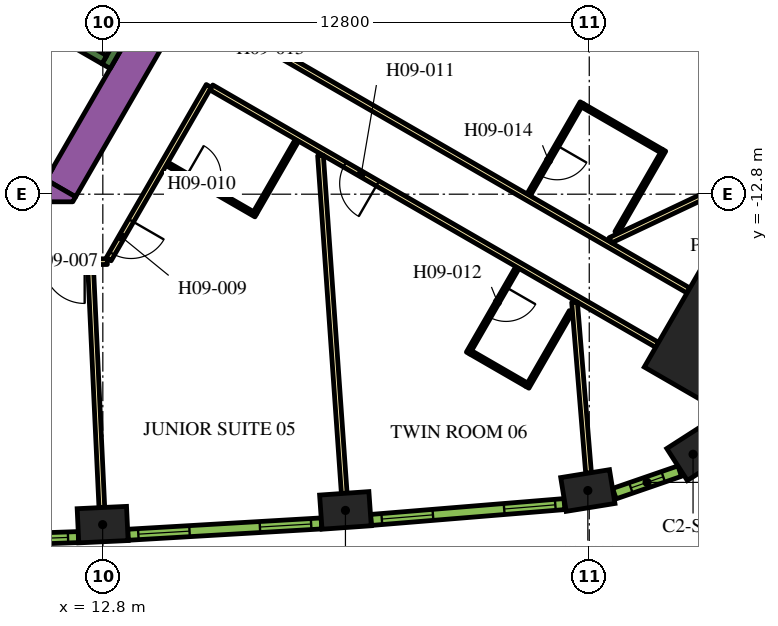
"""IFC4 building model, lengths in metres.
Left out: names, types, materials, properties, quantities, classifications, styles, units other than length and angle.
Written with IfcOpenShell. Run it as: python <this file> out.ifc"""

import sys

from ifc_helpers import new_model, si_unit, direction, frame, frame_2d, origin, origin_2d, place, context, subcontext, project, spatial, polyline, rectangle, outline, extrude, element, fill, save


model = new_model("IFC4")
c1 = context("Model", 3, precision=1e-05, world=origin(), true_north=direction((0.0, 1.0)))
c2 = subcontext(c1, "Body", "Model", "MODEL_VIEW")
j1 = project(units=[si_unit("LENGTHUNIT", "METRE"), si_unit("PLANEANGLEUNIT", "RADIAN")], contexts=[c1])
p1 = place(None, origin())
s1 = spatial("IfcSite", under=j1, at=p1, CompositionType="ELEMENT")
p2 = place(p1, origin())
s2 = spatial("IfcBuilding", under=s1, at=p2, CompositionType="ELEMENT")
p3 = place(p2, frame((0.0, 0.0, 126.6)))
s3 = spatial("IfcBuildingStorey", under=s2, at=p3, CompositionType="ELEMENT", Elevation=126.6)
p4 = place(p3, frame((29.097, -16.799, 0.0), z_axis=(0.0, 0.0, 1.0), x_axis=(0.866025403784, -0.5, 0.0)))
e1 = element("IfcColumn", 1, at=p4, inside=s3, PredefinedType="COLUMN", context=c2, shape_type="SweptSolid", body=[
    extrude(rectangle(XDim=3.0, YDim=3.0, at=origin_2d()), origin(), (0.0, 0.0, 1.0), 3.9),
])
for number, where, z_axis, x_axis in (
    (2, (12.795, -21.494, 0.0), (0.0, 0.0, 1.0), (0.999, 0.047, 0.0)),
    (3, (19.184, -21.12, 0.0), (0.0, 0.0, 1.0), (0.998, 0.07, 0.0)),
    (4, (25.563, -20.597, 0.0), (0.0, 0.0, 1.0), (0.987, 0.159, 0.0)),
):
    element("IfcColumn", number, at=place(p3, frame(where, z_axis=z_axis, x_axis=x_axis)), inside=s3, PredefinedType="COLUMN", context=c2, shape_type="SweptSolid", body=[
        extrude(rectangle(XDim=1.3, YDim=0.9, at=origin_2d()), origin(), (0.0, 0.0, 1.0), 3.9),
    ])
p5 = place(p3, frame((28.331, -19.643, 0.0), z_axis=(0.0, 0.0, 1.0), x_axis=(0.841700252504, 0.53994507585, 0.0)))
e5 = element("IfcColumn", 5, at=p5, inside=s3, PredefinedType="COLUMN", context=c2, shape_type="SweptSolid", body=[
    extrude(rectangle(XDim=1.0, YDim=1.0, at=origin_2d()), origin(), (0.0, 0.0, 1.0), 3.9),
])
p6 = place(p3, frame((11.695, -12.644, 0.0), z_axis=(0.0, 0.0, 1.0), x_axis=(0.500010229568, 0.86601949766, 0.0)))
e6 = element("IfcWall", 6, at=p6, inside=s3, PredefinedType="SOLIDWALL", context=c2, shape_type="SweptSolid", body=[
    extrude(rectangle(XDim=9.326, YDim=0.9, at=frame_2d((4.663, 0.0))), origin(), (0.0, 0.0, 1.0), 3.9),
])
p7 = place(p3, origin())
e7 = element("IfcWall", 7, at=p7, inside=s3, PredefinedType="SOLIDWALL", context=c2, shape_type="SweptSolid", body=[
    extrude(outline(polyline([(12.009, -13.0), (11.312, -13.0), (11.312, -12.425), (12.083, -12.871), (12.009, -13.0)])), origin(), (0.0, 0.0, 1.0), 3.9),
])
e8 = element("IfcWall", 8, at=p7, inside=s3, PredefinedType="SOLIDWALL", context=c2, shape_type="SweptSolid", body=[
    extrude(outline(polyline([(11.489, -12.1), (11.312, -12.407), (11.312, -12.1), (11.489, -12.1)])), origin(), (0.0, 0.0, 1.0), 3.9),
])
p8 = place(p3, frame((12.885, -9.431, 0.0), z_axis=(0.0, 0.0, 1.0), x_axis=(0.500020560727, 0.866013532718, 0.0)))
e9 = element("IfcWall", 9, at=p8, inside=s3, PredefinedType="SOLIDWALL", context=c2, shape_type="SweptSolid", body=[
    extrude(rectangle(XDim=3.45, YDim=0.25, at=frame_2d((1.725, 0.0))), origin(), (0.0, 0.0, 1.0), 3.9),
])
p9 = place(p3, frame((12.84, -9.261, 0.0), z_axis=(0.0, 0.0, 1.0), x_axis=(-0.866013990052, 0.500019768644, 0.0)))
e10 = element("IfcWall", 10, at=p9, inside=s3, PredefinedType="SOLIDWALL", context=c2, shape_type="SweptSolid", body=[
    extrude(rectangle(XDim=6.8, YDim=0.25, at=frame_2d((3.4, 0.0))), origin(), (0.0, 0.0, 1.0), 3.9),
])
p10 = place(p3, frame((16.412, -8.523, 0.0), z_axis=(0.0, 0.0, 1.0), x_axis=(0.866025629663, -0.499999608766, 0.0)))
e11 = element("IfcWall", 11, at=p10, inside=s3, PredefinedType="PARTITIONING", context=c2, shape_type="SweptSolid", body=[
    extrude(rectangle(XDim=13.624, YDim=0.15, at=frame_2d((6.812, 0.0))), origin(), (0.0, 0.0, 1.0), 2.75),
])
p11 = place(p10, frame((0.426, 0.0, 0.0)))
e12 = element("IfcOpeningElement", 12, at=p11, cuts=e11, PredefinedType="OPENING", context=c2, shape_type="SweptSolid", body=[
    extrude(rectangle(XDim=1.0, YDim=2.1, at=frame_2d((0.5, 1.05))), frame((0.0, 0.085, 0.0), z_axis=(0.0, -1.0, 0.0), x_axis=(1.0, 0.0, 0.0)), (0.0, 0.0, 1.0), 0.17),
])
p12 = place(p3, frame((12.918, -14.575, 0.0), z_axis=(0.0, 0.0, 1.0), x_axis=(-1.0, 0.0, 0.0)))
e13 = element("IfcWall", 13, at=p12, inside=s3, PredefinedType="PARTITIONING", context=c2, shape_type="SweptSolid", body=[
    extrude(rectangle(XDim=25.766, YDim=0.15, at=frame_2d((12.883, 0.0))), origin(), (0.0, 0.0, 1.0), 2.75),
])
p13 = place(p12, frame((16.189, 0.0, 0.0)))
e14 = element("IfcOpeningElement", 14, at=p13, cuts=e13, PredefinedType="OPENING", context=c2, shape_type="SweptSolid", body=[
    extrude(rectangle(XDim=1.0, YDim=2.1, at=frame_2d((0.5, 1.05))), frame((0.0, 0.085, 0.0), z_axis=(0.0, -1.0, 0.0), x_axis=(1.0, 0.0, 0.0)), (0.0, 0.0, 1.0), 0.17),
])
p14 = place(p12, frame((14.882, 0.0, 0.0)))
e15 = element("IfcOpeningElement", 15, at=p14, cuts=e13, PredefinedType="OPENING", context=c2, shape_type="SweptSolid", body=[
    extrude(rectangle(XDim=1.0, YDim=2.1, at=frame_2d((0.5, 1.05))), frame((0.0, 0.085, 0.0), z_axis=(0.0, -1.0, 0.0), x_axis=(1.0, 0.0, 0.0)), (0.0, 0.0, 1.0), 0.17),
])
p15 = place(p12, frame((0.596, 0.0, 0.0)))
e16 = element("IfcOpeningElement", 16, at=p15, cuts=e13, PredefinedType="OPENING", context=c2, shape_type="SweptSolid", body=[
    extrude(rectangle(XDim=1.1, YDim=2.1, at=frame_2d((0.55, 1.05))), frame((0.0, 0.085, 0.0), z_axis=(0.0, -1.0, 0.0), x_axis=(1.0, 0.0, 0.0)), (0.0, 0.0, 1.0), 0.17),
])
p16 = place(p3, frame((15.587, -9.952, 0.0), z_axis=(0.0, 0.0, 1.0), x_axis=(-0.500016618951, -0.866015808616, 0.0)))
e17 = element("IfcWall", 17, at=p16, inside=s3, PredefinedType="PARTITIONING", context=c2, shape_type="SweptSolid", body=[
    extrude(rectangle(XDim=5.268, YDim=0.15, at=frame_2d((2.634, 0.0))), origin(), (0.0, 0.0, 1.0), 2.75),
])
p17 = place(p16, frame((4.088, 0.0, 0.0)))
e18 = element("IfcOpeningElement", 18, at=p17, cuts=e17, PredefinedType="OPENING", context=c2, shape_type="SweptSolid", body=[
    extrude(rectangle(XDim=1.0, YDim=2.1, at=frame_2d((0.5, 1.05))), frame((0.0, 0.085, 0.0), z_axis=(0.0, -1.0, 0.0), x_axis=(1.0, 0.0, 0.0)), (0.0, 0.0, 1.0), 0.17),
])
p18 = place(p3, frame((27.386, -16.764, 0.0), z_axis=(0.0, 0.0, 1.0), x_axis=(-0.866022585856, 0.500004880763, 0.0)))
e19 = element("IfcWall", 19, at=p18, inside=s3, PredefinedType="PARTITIONING", context=c2, shape_type="SweptSolid", body=[
    extrude(rectangle(XDim=13.544, YDim=0.15, at=frame_2d((6.772, 0.0))), origin(), (0.0, 0.0, 1.0), 2.75),
])
p19 = place(p18, frame((8.491, 0.0, 0.0)))
e20 = element("IfcOpeningElement", 20, at=p19, cuts=e19, PredefinedType="OPENING", context=c2, shape_type="SweptSolid", body=[
    extrude(rectangle(XDim=1.0, YDim=2.1, at=frame_2d((0.5, 1.05))), frame((0.0, 0.085, 0.0), z_axis=(0.0, -1.0, 0.0), x_axis=(1.0, 0.0, 0.0)), (0.0, 0.0, 1.0), 0.17),
])
p20 = place(p3, frame((12.774, -21.045, 0.0), z_axis=(0.0, 0.0, 1.0), x_axis=(-0.046750341626, 0.998906605023, 0.0)))
e21 = element("IfcWall", 21, at=p20, inside=s3, PredefinedType="PARTITIONING", context=c2, shape_type="SweptSolid", body=[
    extrude(rectangle(XDim=6.392, YDim=0.15, at=frame_2d((3.196, 0.0))), origin(), (0.0, 0.0, 1.0), 2.75),
])
p21 = place(p3, frame((19.153, -20.671, 0.0), z_axis=(0.0, 0.0, 1.0), x_axis=(-0.070070736723, 0.997542025107, 0.0)))
e22 = element("IfcWall", 22, at=p21, inside=s3, PredefinedType="PARTITIONING", context=c2, shape_type="SweptSolid", body=[
    extrude(rectangle(XDim=8.909, YDim=0.15, at=frame_2d((4.455, 0.0))), origin(), (0.0, 0.0, 1.0), 2.75),
])
p22 = place(p3, frame((25.582, -20.138, 0.0), z_axis=(0.0, 0.0, 1.0), x_axis=(-0.081746132986, 0.996653184283, 0.0)))
e23 = element("IfcWall", 23, at=p22, inside=s3, PredefinedType="PARTITIONING", context=c2, shape_type="SweptSolid", body=[
    extrude(rectangle(XDim=4.51, YDim=0.15, at=frame_2d((2.255, 0.0))), origin(), (0.0, 0.0, 1.0), 2.75),
])
p23 = place(p3, frame((30.231, -12.085, 0.0), z_axis=(0.0, 0.0, 1.0), x_axis=(-0.904001132572, -0.427530060122, 0.0)))
e24 = element("IfcWall", 24, at=p23, inside=s3, PredefinedType="PARTITIONING", context=c2, shape_type="SweptSolid", body=[
    extrude(rectangle(XDim=4.51, YDim=0.15, at=frame_2d((2.255, 0.0))), origin(), (0.0, 0.0, 1.0), 2.75),
])
p24 = place(p3, frame((14.49, -12.003, 0.0), z_axis=(0.0, 0.0, 1.0), x_axis=(0.866059108428, -0.4999416173, 0.0)))
e25 = element("IfcWall", 25, at=p24, inside=s3, PredefinedType="PARTITIONING", context=c2, shape_type="SweptSolid", body=[
    extrude(rectangle(XDim=2.7, YDim=0.1, at=frame_2d((1.35, 0.0))), origin(), (0.0, 0.0, 1.0), 2.75),
])
p25 = place(p24, frame((0.6, 0.0, 0.0)))
e26 = element("IfcOpeningElement", 26, at=p25, cuts=e25, PredefinedType="OPENING", context=c2, shape_type="SweptSolid", body=[
    extrude(rectangle(XDim=0.9, YDim=2.1, at=frame_2d((0.45, 1.05))), frame((0.0, 0.06, 0.0), z_axis=(0.0, -1.0, 0.0), x_axis=(1.0, 0.0, 0.0)), (0.0, 0.0, 1.0), 0.12),
])
p26 = place(p3, frame((16.81, -13.285, 0.0), z_axis=(0.0, 0.0, 1.0), x_axis=(0.499994660107, 0.866028486751, 0.0)))
e27 = element("IfcWall", 27, at=p26, inside=s3, PredefinedType="PARTITIONING", context=c2, shape_type="SweptSolid", body=[
    extrude(rectangle(XDim=2.2, YDim=0.1, at=frame_2d((1.1, 0.0))), origin(), (0.0, 0.0, 1.0), 2.75),
])
p27 = place(p3, frame((23.71, -14.728, 0.0), z_axis=(0.0, 0.0, 1.0), x_axis=(-0.500006934395, -0.866021400173, 0.0)))
e28 = element("IfcWall", 28, at=p27, inside=s3, PredefinedType="PARTITIONING", context=c2, shape_type="SweptSolid", body=[
    extrude(rectangle(XDim=2.6, YDim=0.1, at=frame_2d((1.3, 0.0))), origin(), (0.0, 0.0, 1.0), 2.75),
])
p28 = place(p27, frame((0.6, 0.0, 0.0)))
e29 = element("IfcOpeningElement", 29, at=p28, cuts=e28, PredefinedType="OPENING", context=c2, shape_type="SweptSolid", body=[
    extrude(rectangle(XDim=0.9, YDim=2.1, at=frame_2d((0.45, 1.05))), frame((0.0, 0.06, 0.0), z_axis=(0.0, -1.0, 0.0), x_axis=(1.0, 0.0, 0.0)), (0.0, 0.0, 1.0), 0.12),
])
p29 = place(p3, frame((22.479, -16.962, 0.0), z_axis=(0.0, 0.0, 1.0), x_axis=(0.86605165483, -0.499954529098, 0.0)))
e30 = element("IfcWall", 30, at=p29, inside=s3, PredefinedType="PARTITIONING", context=c2, shape_type="SweptSolid", body=[
    extrude(rectangle(XDim=1.7, YDim=0.1, at=frame_2d((0.85, 0.0))), origin(), (0.0, 0.0, 1.0), 2.75),
])
p30 = place(p3, frame((25.119, -15.888, 0.0), z_axis=(0.0, 0.0, 1.0), x_axis=(-0.499998129301, -0.86602648383, 0.0)))
e31 = element("IfcWall", 31, at=p30, inside=s3, PredefinedType="PARTITIONING", context=c2, shape_type="SweptSolid", body=[
    extrude(rectangle(XDim=2.3, YDim=0.1, at=frame_2d((1.15, 0.0))), origin(), (0.0, 0.0, 1.0), 2.75),
])
p31 = place(p3, frame((25.404, -10.395, 0.0), z_axis=(0.0, 0.0, 1.0), x_axis=(-0.49998411664, -0.866034573852, 0.0)))
e32 = element("IfcWall", 32, at=p31, inside=s3, PredefinedType="PARTITIONING", context=c2, shape_type="SweptSolid", body=[
    extrude(rectangle(XDim=2.8, YDim=0.1, at=frame_2d((1.4, 0.0))), origin(), (0.0, 0.0, 1.0), 2.75),
])
p32 = place(p31, frame((1.3, 0.0, 0.0)))
e33 = element("IfcOpeningElement", 33, at=p32, cuts=e32, PredefinedType="OPENING", context=c2, shape_type="SweptSolid", body=[
    extrude(rectangle(XDim=0.9, YDim=2.1, at=frame_2d((0.45, 1.05))), frame((0.0, 0.06, 0.0), z_axis=(0.0, -1.0, 0.0), x_axis=(1.0, 0.0, 0.0)), (0.0, 0.0, 1.0), 0.12),
])
p33 = place(p3, frame((25.422, -10.463, 0.0), z_axis=(0.0, 0.0, 1.0), x_axis=(0.866024647952, -0.500001309137, 0.0)))
e34 = element("IfcWall", 34, at=p33, inside=s3, PredefinedType="PARTITIONING", context=c2, shape_type="SweptSolid", body=[
    extrude(rectangle(XDim=2.4, YDim=0.1, at=frame_2d((1.2, 0.0))), origin(), (0.0, 0.0, 1.0), 2.75),
])
p34 = place(p3, frame((26.319, -13.81, 0.0), z_axis=(0.0, 0.0, 1.0), x_axis=(0.500004234368, 0.866022959057, 0.0)))
e35 = element("IfcWall", 35, at=p34, inside=s3, PredefinedType="PARTITIONING", context=c2, shape_type="SweptSolid", body=[
    extrude(rectangle(XDim=2.5, YDim=0.1, at=frame_2d((1.25, 0.0))), origin(), (0.0, 0.0, 1.0), 2.75),
])
p35 = place(p3, frame((7.059, -22.001, 0.0), z_axis=(0.0, 0.0, 1.0), x_axis=(0.999385993957, 0.035037623812, 0.0)))
e36 = element("IfcWall", 36, at=p35, inside=s3, PredefinedType="SOLIDWALL", context=c2, shape_type="SweptSolid", body=[
    extrude(rectangle(XDim=5.101, YDim=0.29, at=frame_2d((2.55, 0.0))), origin(), (0.0, 0.0, 1.0), 3.65),
])
p36 = place(p35, frame((0.273, 0.0, 0.9)))
e37 = element("IfcOpeningElement", 37, at=p36, cuts=e36, PredefinedType="OPENING", context=c2, shape_type="SweptSolid", body=[
    extrude(rectangle(XDim=1.35, YDim=2.15, at=frame_2d((0.675, 1.075))), frame((0.0, 0.155, 0.0), z_axis=(0.0, -1.0, 0.0), x_axis=(1.0, 0.0, 0.0)), (0.0, 0.0, 1.0), 0.31),
])
p37 = place(p35, frame((3.478, 0.0, 0.9)))
e38 = element("IfcOpeningElement", 38, at=p37, cuts=e36, PredefinedType="OPENING", context=c2, shape_type="SweptSolid", body=[
    extrude(rectangle(XDim=1.35, YDim=2.15, at=frame_2d((0.675, 1.075))), frame((0.0, 0.155, 0.0), z_axis=(0.0, -1.0, 0.0), x_axis=(1.0, 0.0, 0.0)), (0.0, 0.0, 1.0), 0.31),
])
p38 = place(p3, frame((13.462, -21.761, 0.0), z_axis=(0.0, 0.0, 1.0), x_axis=(0.998290511436, 0.058447025388, 0.0)))
e39 = element("IfcWall", 39, at=p38, inside=s3, PredefinedType="SOLIDWALL", context=c2, shape_type="SweptSolid", body=[
    extrude(rectangle(XDim=5.1, YDim=0.29, at=frame_2d((2.55, 0.0))), origin(), (0.0, 0.0, 1.0), 3.65),
])
p39 = place(p38, frame((0.272, 0.0, 0.9)))
e40 = element("IfcOpeningElement", 40, at=p39, cuts=e39, PredefinedType="OPENING", context=c2, shape_type="SweptSolid", body=[
    extrude(rectangle(XDim=1.35, YDim=2.15, at=frame_2d((0.675, 1.075))), frame((0.0, 0.155, 0.0), z_axis=(0.0, -1.0, 0.0), x_axis=(1.0, 0.0, 0.0)), (0.0, 0.0, 1.0), 0.31),
])
p40 = place(p38, frame((3.478, 0.0, 0.9)))
e41 = element("IfcOpeningElement", 41, at=p40, cuts=e39, PredefinedType="OPENING", context=c2, shape_type="SweptSolid", body=[
    extrude(rectangle(XDim=1.35, YDim=2.15, at=frame_2d((0.675, 1.075))), frame((0.0, 0.155, 0.0), z_axis=(0.0, -1.0, 0.0), x_axis=(1.0, 0.0, 0.0)), (0.0, 0.0, 1.0), 0.31),
])
p41 = place(p3, frame((19.857, -21.371, 0.0), z_axis=(0.0, 0.0, 1.0), x_axis=(0.99665273362, 0.081751627308, 0.0)))
e42 = element("IfcWall", 42, at=p41, inside=s3, PredefinedType="SOLIDWALL", context=c2, shape_type="SweptSolid", body=[
    extrude(rectangle(XDim=5.107, YDim=0.29, at=frame_2d((2.553, 0.0))), origin(), (0.0, 0.0, 1.0), 3.65),
])
p42 = place(p41, frame((0.285, 0.0, 0.9)))
e43 = element("IfcOpeningElement", 43, at=p42, cuts=e42, PredefinedType="OPENING", context=c2, shape_type="SweptSolid", body=[
    extrude(rectangle(XDim=1.35, YDim=2.15, at=frame_2d((0.675, 1.075))), frame((0.0, 0.155, 0.0), z_axis=(0.0, -1.0, 0.0), x_axis=(1.0, 0.0, 0.0)), (0.0, 0.0, 1.0), 0.31),
])
p43 = place(p41, frame((3.516, 0.0, 0.9)))
e44 = element("IfcOpeningElement", 44, at=p43, cuts=e42, PredefinedType="OPENING", context=c2, shape_type="SweptSolid", body=[
    extrude(rectangle(XDim=1.35, YDim=2.15, at=frame_2d((0.675, 1.075))), frame((0.0, 0.155, 0.0), z_axis=(0.0, -1.0, 0.0), x_axis=(1.0, 0.0, 0.0)), (0.0, 0.0, 1.0), 0.31),
])
p44 = place(p3, frame((26.261, -20.679, 0.0), z_axis=(0.0, 0.0, 1.0), x_axis=(0.945385815453, 0.325953462844, 0.0)))
e45 = element("IfcWall", 45, at=p44, inside=s3, PredefinedType="SOLIDWALL", context=c2, shape_type="SweptSolid", body=[
    extrude(rectangle(XDim=1.819, YDim=0.29, at=frame_2d((0.91, 0.0))), origin(), (0.0, 0.0, 1.0), 3.65),
])
p45 = place(p44, frame((0.46, 0.0, 0.9)))
e46 = element("IfcOpeningElement", 46, at=p45, cuts=e45, PredefinedType="OPENING", context=c2, shape_type="SweptSolid", body=[
    extrude(rectangle(XDim=0.9, YDim=2.15, at=frame_2d((0.45, 1.075))), frame((0.0, 0.155, 0.0), z_axis=(0.0, -1.0, 0.0), x_axis=(1.0, 0.0, 0.0)), (0.0, 0.0, 1.0), 0.31),
])
p46 = place(p3, frame((30.62, -11.127, 0.0), z_axis=(0.0, 0.0, 1.0), x_axis=(-0.427543726596, 0.903994669148, 0.0)))
e47 = element("IfcWall", 47, at=p46, inside=s3, PredefinedType="SOLIDWALL", context=c2, shape_type="SweptSolid", body=[
    extrude(rectangle(XDim=5.107, YDim=0.29, at=frame_2d((2.553, 0.0))), origin(), (0.0, 0.0, 1.0), 3.65),
])
p47 = place(p46, frame((0.24, 0.0, 0.9)))
e48 = element("IfcOpeningElement", 48, at=p47, cuts=e47, PredefinedType="OPENING", context=c2, shape_type="SweptSolid", body=[
    extrude(rectangle(XDim=1.35, YDim=2.15, at=frame_2d((0.675, 1.075))), frame((0.0, 0.155, 0.0), z_axis=(0.0, -1.0, 0.0), x_axis=(1.0, 0.0, 0.0)), (0.0, 0.0, 1.0), 0.31),
])
p48 = place(p46, frame((3.471, 0.0, 0.9)))
e49 = element("IfcOpeningElement", 49, at=p48, cuts=e47, PredefinedType="OPENING", context=c2, shape_type="SweptSolid", body=[
    extrude(rectangle(XDim=1.35, YDim=2.15, at=frame_2d((0.675, 1.075))), frame((0.0, 0.155, 0.0), z_axis=(0.0, -1.0, 0.0), x_axis=(1.0, 0.0, 0.0)), (0.0, 0.0, 1.0), 0.31),
])
p49 = place(p15, origin())
e50 = element("IfcDoor", 50, at=p49, inside=s3, OperationType="SINGLE_SWING_LEFT", PredefinedType="DOOR", context=c2, shape_type="SweptSolid", body=[
    extrude(rectangle(XDim=1.1, YDim=2.1, at=frame_2d((0.55, 1.05))), frame((0.0, 0.025, 0.0), z_axis=(0.0, -1.0, 0.0), x_axis=(1.0, 0.0, 0.0)), (0.0, 0.0, 1.0), 0.05),
])
fill(e16, e50)
p50 = place(p17, origin())
e51 = element("IfcDoor", 51, at=p50, inside=s3, OperationType="SINGLE_SWING_RIGHT", PredefinedType="DOOR", context=c2, shape_type="SweptSolid", body=[
    extrude(rectangle(XDim=1.0, YDim=2.1, at=frame_2d((0.5, 1.05))), frame((0.0, 0.025, 0.0), z_axis=(0.0, -1.0, 0.0), x_axis=(1.0, 0.0, 0.0)), (0.0, 0.0, 1.0), 0.05),
])
fill(e18, e51)
p51 = place(p25, origin())
e52 = element("IfcDoor", 52, at=p51, inside=s3, OperationType="SINGLE_SWING_LEFT", PredefinedType="DOOR", context=c2, shape_type="SweptSolid", body=[
    extrude(rectangle(XDim=0.9, YDim=2.1, at=frame_2d((0.45, 1.05))), frame((0.0, 0.025, 0.0), z_axis=(0.0, -1.0, 0.0), x_axis=(1.0, 0.0, 0.0)), (0.0, 0.0, 1.0), 0.05),
])
fill(e26, e52)
p52 = place(p19, origin())
e53 = element("IfcDoor", 53, at=p52, inside=s3, OperationType="SINGLE_SWING_RIGHT", PredefinedType="DOOR", context=c2, shape_type="SweptSolid", body=[
    extrude(rectangle(XDim=1.0, YDim=2.1, at=frame_2d((0.5, 1.05))), frame((0.0, 0.025, 0.0), z_axis=(0.0, -1.0, 0.0), x_axis=(1.0, 0.0, 0.0)), (0.0, 0.0, 1.0), 0.05),
])
fill(e20, e53)
p53 = place(p28, origin())
e54 = element("IfcDoor", 54, at=p53, inside=s3, OperationType="SINGLE_SWING_RIGHT", PredefinedType="DOOR", context=c2, shape_type="SweptSolid", body=[
    extrude(rectangle(XDim=0.9, YDim=2.1, at=frame_2d((0.45, 1.05))), frame((0.0, 0.025, 0.0), z_axis=(0.0, -1.0, 0.0), x_axis=(1.0, 0.0, 0.0)), (0.0, 0.0, 1.0), 0.05),
])
fill(e29, e54)
p54 = place(p11, origin())
e55 = element("IfcDoor", 55, at=p54, inside=s3, OperationType="SINGLE_SWING_LEFT", PredefinedType="DOOR", context=c2, shape_type="SweptSolid", body=[
    extrude(rectangle(XDim=1.0, YDim=2.1, at=frame_2d((0.5, 1.05))), frame((0.0, 0.025, 0.0), z_axis=(0.0, -1.0, 0.0), x_axis=(1.0, 0.0, 0.0)), (0.0, 0.0, 1.0), 0.05),
])
fill(e12, e55)
p55 = place(p32, origin())
e56 = element("IfcDoor", 56, at=p55, inside=s3, OperationType="SINGLE_SWING_LEFT", PredefinedType="DOOR", context=c2, shape_type="SweptSolid", body=[
    extrude(rectangle(XDim=0.9, YDim=2.1, at=frame_2d((0.45, 1.05))), frame((0.0, 0.025, 0.0), z_axis=(0.0, -1.0, 0.0), x_axis=(1.0, 0.0, 0.0)), (0.0, 0.0, 1.0), 0.05),
])
fill(e33, e56)
p56 = place(p37, origin())
e57 = element("IfcWindow", 57, at=p56, inside=s3, PartitioningType="DOUBLE_PANEL_VERTICAL", PredefinedType="WINDOW", context=c2, shape_type="SweptSolid", body=[
    extrude(rectangle(XDim=1.35, YDim=2.15, at=frame_2d((0.675, 1.075))), frame((0.0, 0.015, 0.0), z_axis=(0.0, -1.0, 0.0), x_axis=(1.0, 0.0, 0.0)), (0.0, 0.0, 1.0), 0.06),
])
fill(e38, e57)
p57 = place(p39, origin())
e58 = element("IfcWindow", 58, at=p57, inside=s3, PartitioningType="DOUBLE_PANEL_VERTICAL", PredefinedType="WINDOW", context=c2, shape_type="SweptSolid", body=[
    extrude(rectangle(XDim=1.35, YDim=2.15, at=frame_2d((0.675, 1.075))), frame((0.0, 0.015, 0.0), z_axis=(0.0, -1.0, 0.0), x_axis=(1.0, 0.0, 0.0)), (0.0, 0.0, 1.0), 0.06),
])
fill(e40, e58)
p58 = place(p40, origin())
e59 = element("IfcWindow", 59, at=p58, inside=s3, PartitioningType="DOUBLE_PANEL_VERTICAL", PredefinedType="WINDOW", context=c2, shape_type="SweptSolid", body=[
    extrude(rectangle(XDim=1.35, YDim=2.15, at=frame_2d((0.675, 1.075))), frame((0.0, 0.015, 0.0), z_axis=(0.0, -1.0, 0.0), x_axis=(1.0, 0.0, 0.0)), (0.0, 0.0, 1.0), 0.06),
])
fill(e41, e59)
p59 = place(p42, origin())
e60 = element("IfcWindow", 60, at=p59, inside=s3, PartitioningType="DOUBLE_PANEL_VERTICAL", PredefinedType="WINDOW", context=c2, shape_type="SweptSolid", body=[
    extrude(rectangle(XDim=1.35, YDim=2.15, at=frame_2d((0.675, 1.075))), frame((0.0, 0.015, 0.0), z_axis=(0.0, -1.0, 0.0), x_axis=(1.0, 0.0, 0.0)), (0.0, 0.0, 1.0), 0.06),
])
fill(e43, e60)
p60 = place(p43, origin())
e61 = element("IfcWindow", 61, at=p60, inside=s3, PartitioningType="DOUBLE_PANEL_VERTICAL", PredefinedType="WINDOW", context=c2, shape_type="SweptSolid", body=[
    extrude(rectangle(XDim=1.35, YDim=2.15, at=frame_2d((0.675, 1.075))), frame((0.0, 0.015, 0.0), z_axis=(0.0, -1.0, 0.0), x_axis=(1.0, 0.0, 0.0)), (0.0, 0.0, 1.0), 0.06),
])
fill(e44, e61)
p61 = place(p45, origin())
e62 = element("IfcWindow", 62, at=p61, inside=s3, PartitioningType="SINGLE_PANEL", PredefinedType="WINDOW", context=c2, shape_type="SweptSolid", body=[
    extrude(rectangle(XDim=0.9, YDim=2.15, at=frame_2d((0.45, 1.075))), frame((0.0, 0.015, 0.0), z_axis=(0.0, -1.0, 0.0), x_axis=(1.0, 0.0, 0.0)), (0.0, 0.0, 1.0), 0.06),
])
fill(e46, e62)
save(model, sys.argv[1])
